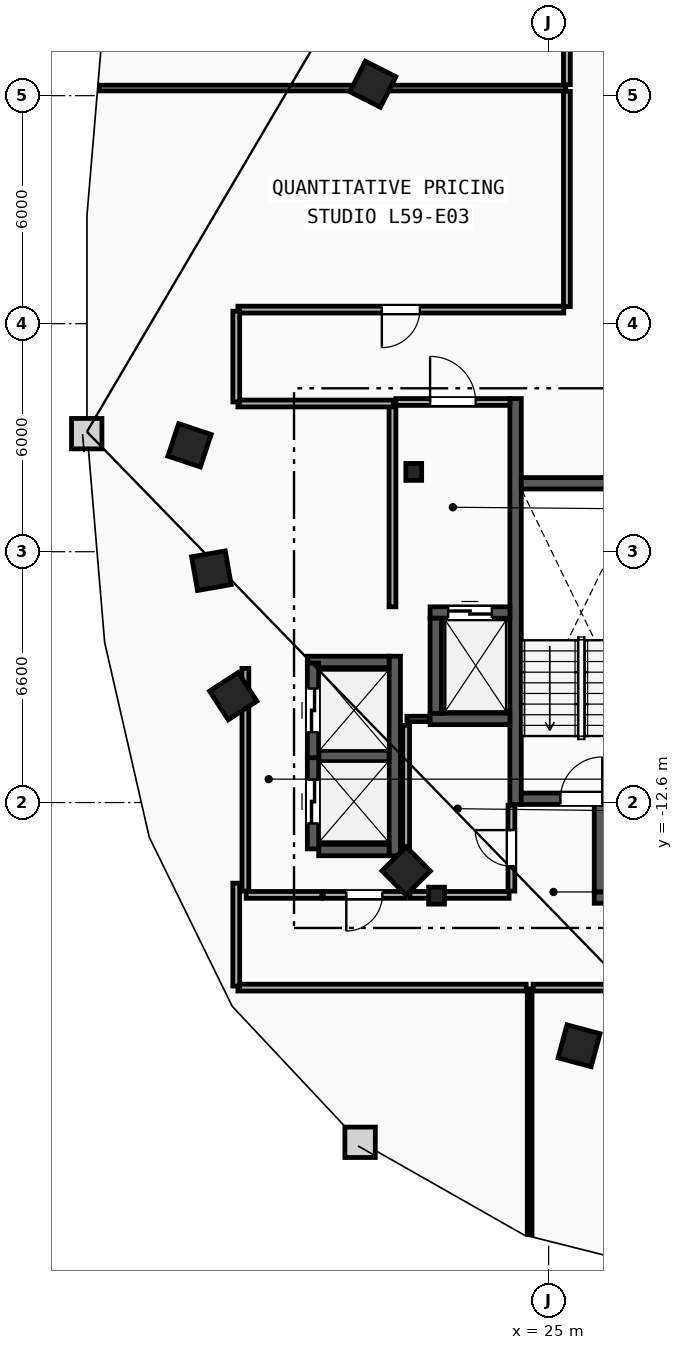
"""IFC4 building model, lengths in metres.
Left out: names, types, materials, properties, quantities, classifications, styles, units other than length and angle.
Written with IfcOpenShell. Run it as: python <this file> out.ifc"""

import sys

from ifc_helpers import new_model, si_unit, direction, frame, frame_2d, origin, origin_2d, place, context, subcontext, project, spatial, rectangle, i_section, extrude, element, fill, save


model = new_model("IFC4")
c1 = context("Model", 3, precision=1e-05, world=origin(), true_north=direction((0.0, 1.0)))
c2 = subcontext(c1, "Body", "Model", "MODEL_VIEW")
j1 = project(units=[si_unit("LENGTHUNIT", "METRE"), si_unit("PLANEANGLEUNIT", "RADIAN")], contexts=[c1])
p1 = place(None, origin())
s1 = spatial("IfcSite", under=j1, at=p1, CompositionType="ELEMENT")
p2 = place(p1, origin())
s2 = spatial("IfcBuilding", under=s1, at=p2, CompositionType="ELEMENT")
p3 = place(p2, frame((0.0, 0.0, 224.2)))
s3 = spatial("IfcBuildingStorey", under=s2, at=p3, CompositionType="ELEMENT", Elevation=224.2)
for number, where, z_axis, x_axis in (
    (1, (21.45, -3.9, 0.0), (0.0, 0.0, 1.0), (1.0, 0.0, 0.0)),
    (2, (22.05, -15.05, 0.0), (0.0, 0.0, 1.0), (1.0, 0.0, 0.0)),
):
    element("IfcColumn", number, at=place(p3, frame(where, z_axis=z_axis, x_axis=x_axis)), inside=s3, PredefinedType="COLUMN", context=c2, shape_type="SweptSolid", body=[
        extrude(i_section(OverallWidth=0.416, OverallDepth=0.446, WebThickness=0.039, FlangeThickness=0.063, FilletRadius=0.018, at=origin_2d()), origin(), (0.0, 0.0, 1.0), 3.6),
    ])
for number, where, z_axis, x_axis in (
    (3, (15.55, -3.2, 0.0), (0.0, 0.0, 1.0), (-0.315, -0.949, 0.0)),
    (4, (16.125, -6.5, 0.0), (0.0, 0.0, 1.0), (0.172, -0.985, 0.0)),
    (5, (16.7, -9.8, 0.0), (0.0, 0.0, 1.0), (0.544, -0.839, 0.0)),
    (6, (21.25, -14.4, 0.0), (0.0, 0.0, 1.0), (0.703, -0.711, 0.0)),
    (7, (25.8, -19.0, 0.0), (0.0, 0.0, 1.0), (0.966, -0.259, 0.0)),
    (8, (20.375, 6.3, 0.0), (0.0, 0.0, 1.0), (-0.453, -0.892, 0.0)),
):
    element("IfcColumn", number, at=place(p3, frame(where, z_axis=z_axis, x_axis=x_axis)), inside=s3, PredefinedType="COLUMN", context=c2, shape_type="SweptSolid", body=[
        extrude(rectangle(XDim=0.9, YDim=0.9, at=origin_2d()), origin(), (0.0, 0.0, 1.0), 3.6),
    ])
p4 = place(p3, frame((24.13, -12.65, 0.0), z_axis=(0.0, 0.0, 1.0), x_axis=(0.0, 1.0, 0.0)))
e9 = element("IfcWall", 9, at=p4, inside=s3, PredefinedType="SHEAR", context=c2, shape_type="SweptSolid", body=[
    extrude(rectangle(XDim=10.68, YDim=0.3, at=frame_2d((5.34, 0.0))), origin(), (0.0, 0.0, 1.0), 3.34),
])
p5 = place(p3, frame((24.28, -12.5, 0.0), z_axis=(0.0, 0.0, 1.0), x_axis=(1.0, 0.0, 0.0)))
e10 = element("IfcWall", 10, at=p5, inside=s3, PredefinedType="SHEAR", context=c2, shape_type="SweptSolid", body=[
    extrude(rectangle(XDim=3.16, YDim=0.3, at=frame_2d((1.58, 0.0))), origin(), (0.0, 0.0, 1.0), 3.34),
])
p6 = place(p5, frame((1.03, 0.0, 0.0)))
e11 = element("IfcOpeningElement", 11, at=p6, cuts=e10, PredefinedType="OPENING", context=c2, shape_type="SweptSolid", body=[
    extrude(rectangle(XDim=1.1, YDim=2.15, at=frame_2d((0.55, 1.075))), frame((0.0, 0.16, 0.0), z_axis=(0.0, -1.0, 0.0), x_axis=(1.0, 0.0, 0.0)), (0.0, 0.0, 1.0), 0.32),
])
p7 = place(p3, frame((24.28, -4.2, 0.0), z_axis=(0.0, 0.0, 1.0), x_axis=(1.0, 0.0, 0.0)))
e12 = element("IfcWall", 12, at=p7, inside=s3, PredefinedType="SHEAR", context=c2, shape_type="SweptSolid", body=[
    extrude(rectangle(XDim=3.16, YDim=0.3, at=frame_2d((1.58, 0.0))), origin(), (0.0, 0.0, 1.0), 3.34),
])
p8 = place(p3, frame((20.89, -7.45, 0.0), z_axis=(0.0, 0.0, 1.0), x_axis=(0.0, 1.0, 0.0)))
e13 = element("IfcWall", 13, at=p8, inside=s3, PredefinedType="PARTITIONING", context=c2, shape_type="SweptSolid", body=[
    extrude(rectangle(XDim=5.3, YDim=0.18, at=frame_2d((2.65, 0.0))), origin(), (0.0, 0.0, 1.0), 3.34),
])
p9 = place(p3, frame((20.98, -2.06, 0.0), z_axis=(0.0, 0.0, 1.0), x_axis=(1.0, 0.0, 0.0)))
e14 = element("IfcWall", 14, at=p9, inside=s3, PredefinedType="PARTITIONING", context=c2, shape_type="SweptSolid", body=[
    extrude(rectangle(XDim=3.0, YDim=0.18, at=frame_2d((1.5, 0.0))), origin(), (0.0, 0.0, 1.0), 3.34),
])
p10 = place(p9, frame((0.9, 0.0, 0.0)))
e15 = element("IfcOpeningElement", 15, at=p10, cuts=e14, PredefinedType="OPENING", context=c2, shape_type="SweptSolid", body=[
    extrude(rectangle(XDim=1.2, YDim=2.15, at=frame_2d((0.6, 1.075))), frame((0.0, 0.1, 0.0), z_axis=(0.0, -1.0, 0.0), x_axis=(1.0, 0.0, 0.0)), (0.0, 0.0, 1.0), 0.2),
])
p11 = place(p3, frame((21.88, -7.6, 0.0), z_axis=(0.0, 0.0, 1.0), x_axis=(1.0, 0.0, 0.0)))
e16 = element("IfcWall", 16, at=p11, inside=s3, PredefinedType="SHEAR", context=c2, shape_type="SweptSolid", body=[
    extrude(rectangle(XDim=2.1, YDim=0.3, at=frame_2d((1.05, 0.0))), origin(), (0.0, 0.0, 1.0), 3.34),
])
p12 = place(p11, frame((0.475, 0.0, 0.0)))
e17 = element("IfcOpeningElement", 17, at=p12, cuts=e16, PredefinedType="OPENING", context=c2, shape_type="SweptSolid", body=[
    extrude(rectangle(XDim=1.15, YDim=2.2, at=frame_2d((0.575, 1.1))), frame((0.0, 0.16, 0.0), z_axis=(0.0, -1.0, 0.0), x_axis=(1.0, 0.0, 0.0)), (0.0, 0.0, 1.0), 0.32),
])
p13 = place(p3, frame((21.88, -10.4, 0.0), z_axis=(0.0, 0.0, 1.0), x_axis=(1.0, 0.0, 0.0)))
e18 = element("IfcWall", 18, at=p13, inside=s3, PredefinedType="SHEAR", context=c2, shape_type="SweptSolid", body=[
    extrude(rectangle(XDim=2.1, YDim=0.3, at=frame_2d((1.05, 0.0))), origin(), (0.0, 0.0, 1.0), 3.34),
])
for number, where, z_axis, x_axis in (
    (19, (22.03, -10.25, 0.0), (0.0, 0.0, 1.0), (0.0, 1.0, 0.0)),
    (20, (26.2, -15.1, 0.0), (0.0, 0.0, 1.0), (1.0, 0.0, 0.0)),
):
    element("IfcWall", number, at=place(p3, frame(where, z_axis=z_axis, x_axis=x_axis)), inside=s3, PredefinedType="SHEAR", context=c2, shape_type="SweptSolid", body=[
        extrude(rectangle(XDim=2.5, YDim=0.3, at=frame_2d((1.25, 0.0))), origin(), (0.0, 0.0, 1.0), 3.34),
    ])
p14 = place(p3, frame((26.35, -14.95, 0.0), z_axis=(0.0, 0.0, 1.0), x_axis=(0.0, 1.0, 0.0)))
e21 = element("IfcWall", 21, at=p14, inside=s3, PredefinedType="SHEAR", context=c2, shape_type="SweptSolid", body=[
    extrude(rectangle(XDim=2.3, YDim=0.3, at=frame_2d((1.15, 0.0))), origin(), (0.0, 0.0, 1.0), 3.34),
])
p15 = place(p3, frame((20.95, -14.0, 0.0), z_axis=(0.0, 0.0, 1.0), x_axis=(0.0, 1.0, 0.0)))
e22 = element("IfcWall", 22, at=p15, inside=s3, PredefinedType="SHEAR", context=c2, shape_type="SweptSolid", body=[
    extrude(rectangle(XDim=5.25, YDim=0.3, at=frame_2d((2.625, 0.0))), origin(), (0.0, 0.0, 1.0), 3.34),
])
p16 = place(p3, frame((18.95, -13.85, 0.0), z_axis=(0.0, 0.0, 1.0), x_axis=(1.0, 0.0, 0.0)))
e23 = element("IfcWall", 23, at=p16, inside=s3, PredefinedType="SHEAR", context=c2, shape_type="SweptSolid", body=[
    extrude(rectangle(XDim=1.85, YDim=0.3, at=frame_2d((0.925, 0.0))), origin(), (0.0, 0.0, 1.0), 3.34),
])
p17 = place(p3, frame((18.65, -8.9, 0.0), z_axis=(0.0, 0.0, 1.0), x_axis=(1.0, 0.0, 0.0)))
e24 = element("IfcWall", 24, at=p17, inside=s3, PredefinedType="SHEAR", context=c2, shape_type="SweptSolid", body=[
    extrude(rectangle(XDim=2.15, YDim=0.3, at=frame_2d((1.075, 0.0))), origin(), (0.0, 0.0, 1.0), 3.34),
])
p18 = place(p3, frame((18.95, -11.375, 0.0), z_axis=(0.0, 0.0, 1.0), x_axis=(1.0, 0.0, 0.0)))
e25 = element("IfcWall", 25, at=p18, inside=s3, PredefinedType="SHEAR", context=c2, shape_type="SweptSolid", body=[
    extrude(rectangle(XDim=1.85, YDim=0.3, at=frame_2d((0.925, 0.0))), origin(), (0.0, 0.0, 1.0), 3.34),
])
p19 = place(p3, frame((18.8, -13.82, 0.0), z_axis=(0.0, 0.0, 1.0), x_axis=(0.0, 1.0, 0.0)))
e26 = element("IfcWall", 26, at=p19, inside=s3, PredefinedType="SHEAR", context=c2, shape_type="SweptSolid", body=[
    extrude(rectangle(XDim=2.49, YDim=0.3, at=frame_2d((1.245, 0.0))), origin(), (0.0, 0.0, 1.0), 3.34),
])
p20 = place(p19, frame((0.67, 0.0, 0.0)))
e27 = element("IfcOpeningElement", 27, at=p20, cuts=e26, PredefinedType="OPENING", context=c2, shape_type="SweptSolid", body=[
    extrude(rectangle(XDim=1.15, YDim=2.2, at=frame_2d((0.575, 1.1))), frame((0.0, 0.16, 0.0), z_axis=(0.0, -1.0, 0.0), x_axis=(1.0, 0.0, 0.0)), (0.0, 0.0, 1.0), 0.32),
])
p21 = place(p3, frame((18.8, -11.42, 0.0), z_axis=(0.0, 0.0, 1.0), x_axis=(0.0, 1.0, 0.0)))
e28 = element("IfcWall", 28, at=p21, inside=s3, PredefinedType="SHEAR", context=c2, shape_type="SweptSolid", body=[
    extrude(rectangle(XDim=2.49, YDim=0.3, at=frame_2d((1.245, 0.0))), origin(), (0.0, 0.0, 1.0), 3.34),
])
p22 = place(p21, frame((0.67, 0.0, 0.0)))
e29 = element("IfcOpeningElement", 29, at=p22, cuts=e28, PredefinedType="OPENING", context=c2, shape_type="SweptSolid", body=[
    extrude(rectangle(XDim=1.15, YDim=2.2, at=frame_2d((0.575, 1.1))), frame((0.0, 0.16, 0.0), z_axis=(0.0, -1.0, 0.0), x_axis=(1.0, 0.0, 0.0)), (0.0, 0.0, 1.0), 0.32),
])
p23 = place(p3, frame((17.02, -14.93, 0.0), z_axis=(0.0, 0.0, 1.0), x_axis=(0.0, 1.0, 0.0)))
e30 = element("IfcWall", 30, at=p23, inside=s3, PredefinedType="PARTITIONING", context=c2, shape_type="SweptSolid", body=[
    extrude(rectangle(XDim=5.86, YDim=0.18, at=frame_2d((2.93, 0.0))), origin(), (0.0, 0.0, 1.0), 3.34),
])
p24 = place(p3, frame((17.04, -15.03, 0.0), z_axis=(0.0, 0.0, 1.0), x_axis=(1.0, 0.0, 0.0)))
e31 = element("IfcWall", 31, at=p24, inside=s3, PredefinedType="PARTITIONING", context=c2, shape_type="SweptSolid", body=[
    extrude(rectangle(XDim=1.99, YDim=0.18, at=frame_2d((0.995, 0.0))), origin(), (0.0, 0.0, 1.0), 3.34),
])
p25 = place(p3, frame((21.23, -15.03, 0.0), z_axis=(0.0, 0.0, 1.0), x_axis=(-1.0, 0.0, 0.0)))
e32 = element("IfcWall", 32, at=p25, inside=s3, PredefinedType="PARTITIONING", context=c2, shape_type="SweptSolid", body=[
    extrude(rectangle(XDim=2.16, YDim=0.18, at=frame_2d((1.08, 0.0))), origin(), (0.0, 0.0, 1.0), 3.34),
])
p26 = place(p25, frame((0.605, 0.0, 0.0)))
e33 = element("IfcOpeningElement", 33, at=p26, cuts=e32, PredefinedType="OPENING", context=c2, shape_type="SweptSolid", body=[
    extrude(rectangle(XDim=0.95, YDim=2.1, at=frame_2d((0.475, 1.05))), frame((0.0, 0.1, 0.0), z_axis=(0.0, -1.0, 0.0), x_axis=(1.0, 0.0, 0.0)), (0.0, 0.0, 1.0), 0.2),
])
p27 = place(p3, frame((21.27, -10.4, 0.0), z_axis=(0.0, 0.0, 1.0), x_axis=(1.0, 0.0, 0.0)))
e34 = element("IfcWall", 34, at=p27, inside=s3, PredefinedType="PARTITIONING", context=c2, shape_type="SweptSolid", body=[
    extrude(rectangle(XDim=0.59, YDim=0.14, at=frame_2d((0.295, 0.0))), origin(), (0.0, 0.0, 1.0), 3.34),
])
p28 = place(p3, frame((21.25, -14.93, 0.0), z_axis=(0.0, 0.0, 1.0), x_axis=(0.0, 1.0, 0.0)))
e35 = element("IfcWall", 35, at=p28, inside=s3, PredefinedType="PARTITIONING", context=c2, shape_type="SweptSolid", body=[
    extrude(rectangle(XDim=4.36, YDim=0.18, at=frame_2d((2.18, 0.0))), origin(), (0.0, 0.0, 1.0), 3.34),
])
p29 = place(p3, frame((21.35, -15.03, 0.0), z_axis=(0.0, 0.0, 1.0), x_axis=(1.0, 0.0, 0.0)))
e36 = element("IfcWall", 36, at=p29, inside=s3, PredefinedType="PARTITIONING", context=c2, shape_type="SweptSolid", body=[
    extrude(rectangle(XDim=2.61, YDim=0.18, at=frame_2d((1.305, 0.0))), origin(), (0.0, 0.0, 1.0), 2.413),
])
p30 = place(p3, frame((24.02, -14.93, 0.0), z_axis=(0.0, 0.0, 1.0), x_axis=(0.0, 1.0, 0.0)))
e37 = element("IfcWall", 37, at=p30, inside=s3, PredefinedType="PARTITIONING", context=c2, shape_type="SweptSolid", body=[
    extrude(rectangle(XDim=2.26, YDim=0.18, at=frame_2d((1.13, 0.0))), origin(), (0.0, 0.0, 1.0), 3.34),
])
p31 = place(p30, frame((0.655, 0.0, 0.0)))
e38 = element("IfcOpeningElement", 38, at=p31, cuts=e37, PredefinedType="OPENING", context=c2, shape_type="SweptSolid", body=[
    extrude(rectangle(XDim=0.95, YDim=2.1, at=frame_2d((0.475, 1.05))), frame((0.0, 0.1, 0.0), z_axis=(0.0, -1.0, 0.0), x_axis=(1.0, 0.0, 0.0)), (0.0, 0.0, 1.0), 0.2),
])
p32 = place(p3, frame((13.183, 6.2, 0.0), z_axis=(0.0, 0.0, 1.0), x_axis=(1.0, 0.0, 0.0)))
e39 = element("IfcWall", 39, at=p32, inside=s3, PredefinedType="PARTITIONING", context=c2, shape_type="SweptSolid", body=[
    extrude(rectangle(XDim=12.267, YDim=0.15, at=frame_2d((6.133, 0.0))), origin(), (0.0, 0.0, 1.0), 3.34),
])
p33 = place(p3, frame((24.5, -23.963, 0.0), z_axis=(0.0, 0.0, 1.0), x_axis=(0.0, 1.0, 0.0)))
e40 = element("IfcWall", 40, at=p33, inside=s3, PredefinedType="PARTITIONING", context=c2, shape_type="SweptSolid", body=[
    extrude(rectangle(XDim=6.463, YDim=0.125, at=frame_2d((3.231, 0.0))), origin(), (0.0, 0.0, 1.0), 3.34),
])
p34 = place(p3, frame((24.59, -17.47, 0.0), z_axis=(0.0, 0.0, 1.0), x_axis=(1.0, 0.0, 0.0)))
e41 = element("IfcWall", 41, at=p34, inside=s3, PredefinedType="PARTITIONING", context=c2, shape_type="SweptSolid", body=[
    extrude(rectangle(XDim=7.82, YDim=0.18, at=frame_2d((3.91, 0.0))), origin(), (0.0, 0.0, 1.0), 3.34),
])
p35 = place(p34, frame((3.41, 0.0, 0.0)))
e42 = element("IfcOpeningElement", 42, at=p35, cuts=e41, PredefinedType="OPENING", context=c2, shape_type="SweptSolid", body=[
    extrude(rectangle(XDim=1.0, YDim=2.15, at=frame_2d((0.5, 1.075))), frame((0.0, 0.1, 0.0), z_axis=(0.0, -1.0, 0.0), x_axis=(1.0, 0.0, 0.0)), (0.0, 0.0, 1.0), 0.2),
])
p36 = place(p3, frame((25.4, 0.37, 0.0), z_axis=(0.0, 0.0, 1.0), x_axis=(-1.0, 0.0, 0.0)))
e43 = element("IfcWall", 43, at=p36, inside=s3, PredefinedType="PARTITIONING", context=c2, shape_type="SweptSolid", body=[
    extrude(rectangle(XDim=8.578, YDim=0.18, at=frame_2d((4.289, 0.0))), origin(), (0.0, 0.0, 1.0), 3.34),
])
p37 = place(p36, frame((3.789, 0.0, 0.0)))
e44 = element("IfcOpeningElement", 44, at=p37, cuts=e43, PredefinedType="OPENING", context=c2, shape_type="SweptSolid", body=[
    extrude(rectangle(XDim=1.0, YDim=2.15, at=frame_2d((0.5, 1.075))), frame((0.0, 0.1, 0.0), z_axis=(0.0, -1.0, 0.0), x_axis=(1.0, 0.0, 0.0)), (0.0, 0.0, 1.0), 0.2),
])
p38 = place(p3, frame((16.822, -17.47, 0.0), z_axis=(0.0, 0.0, 1.0), x_axis=(1.0, 0.0, 0.0)))
e45 = element("IfcWall", 45, at=p38, inside=s3, PredefinedType="PARTITIONING", context=c2, shape_type="SweptSolid", body=[
    extrude(rectangle(XDim=7.588, YDim=0.18, at=frame_2d((3.794, 0.0))), origin(), (0.0, 0.0, 1.0), 3.34),
])
p39 = place(p3, frame((25.48, 6.11, 0.0), z_axis=(0.0, 0.0, 1.0), x_axis=(0.0, -1.0, 0.0)))
e46 = element("IfcWall", 46, at=p39, inside=s3, PredefinedType="PARTITIONING", context=c2, shape_type="SweptSolid", body=[
    extrude(rectangle(XDim=5.66, YDim=0.18, at=frame_2d((2.83, 0.0))), origin(), (0.0, 0.0, 1.0), 3.34),
])
p40 = place(p3, frame((16.822, -2.1, 0.0), z_axis=(0.0, 0.0, 1.0), x_axis=(1.0, 0.0, 0.0)))
e47 = element("IfcWall", 47, at=p40, inside=s3, PredefinedType="PARTITIONING", context=c2, shape_type="SweptSolid", body=[
    extrude(rectangle(XDim=4.098, YDim=0.18, at=frame_2d((2.049, 0.0))), origin(), (0.0, 0.0, 1.0), 3.34),
])
p41 = place(p3, frame((16.78, -14.721, 0.0), z_axis=(0.0, 0.0, 1.0), x_axis=(0.0, -1.0, 0.0)))
e48 = element("IfcWall", 48, at=p41, inside=s3, PredefinedType="PARTITIONING", context=c2, shape_type="SweptSolid", body=[
    extrude(rectangle(XDim=2.707, YDim=0.18, at=frame_2d((1.354, 0.0))), origin(), (0.0, 0.0, 1.0), 3.34),
])
p42 = place(p3, frame((16.78, 0.329, 0.0), z_axis=(0.0, 0.0, 1.0), x_axis=(0.0, -1.0, 0.0)))
e49 = element("IfcWall", 49, at=p42, inside=s3, PredefinedType="PARTITIONING", context=c2, shape_type="SweptSolid", body=[
    extrude(rectangle(XDim=2.387, YDim=0.18, at=frame_2d((1.194, 0.0))), origin(), (0.0, 0.0, 1.0), 3.34),
])
p43 = place(p3, frame((25.48, 11.178, 0.0), z_axis=(0.0, 0.0, 1.0), x_axis=(0.0, -1.0, 0.0)))
e50 = element("IfcWall", 50, at=p43, inside=s3, PredefinedType="PARTITIONING", context=c2, shape_type="SweptSolid", body=[
    extrude(rectangle(XDim=4.888, YDim=0.18, at=frame_2d((2.444, 0.0))), origin(), (0.0, 0.0, 1.0), 3.34),
])
p44 = place(p6, origin())
e51 = element("IfcDoor", 51, at=p44, inside=s3, OperationType="SINGLE_SWING_RIGHT", PredefinedType="DOOR", context=c2, shape_type="SweptSolid", body=[
    extrude(rectangle(XDim=1.1, YDim=2.15, at=frame_2d((0.55, 1.075))), frame((0.0, 0.025, 0.0), z_axis=(0.0, -1.0, 0.0), x_axis=(1.0, 0.0, 0.0)), (0.0, 0.0, 1.0), 0.05),
])
fill(e11, e51)
p45 = place(p10, origin())
e52 = element("IfcDoor", 52, at=p45, inside=s3, OperationType="SINGLE_SWING_LEFT", PredefinedType="DOOR", context=c2, shape_type="SweptSolid", body=[
    extrude(rectangle(XDim=1.2, YDim=2.15, at=frame_2d((0.6, 1.075))), frame((0.0, 0.025, 0.0), z_axis=(0.0, -1.0, 0.0), x_axis=(1.0, 0.0, 0.0)), (0.0, 0.0, 1.0), 0.05),
])
fill(e15, e52)
p46 = place(p12, origin())
e53 = element("IfcDoor", 53, at=p46, inside=s3, OperationType="SLIDING_TO_LEFT", PredefinedType="TRAPDOOR", context=c2, shape_type="SweptSolid", body=[
    extrude(rectangle(XDim=1.15, YDim=2.2, at=frame_2d((0.575, 1.1))), frame((0.0, 0.025, 0.0), z_axis=(0.0, -1.0, 0.0), x_axis=(1.0, 0.0, 0.0)), (0.0, 0.0, 1.0), 0.05),
])
fill(e17, e53)
p47 = place(p20, origin())
e54 = element("IfcDoor", 54, at=p47, inside=s3, OperationType="SLIDING_TO_LEFT", PredefinedType="TRAPDOOR", context=c2, shape_type="SweptSolid", body=[
    extrude(rectangle(XDim=1.15, YDim=2.2, at=frame_2d((0.575, 1.1))), frame((0.0, 0.025, 0.0), z_axis=(0.0, -1.0, 0.0), x_axis=(1.0, 0.0, 0.0)), (0.0, 0.0, 1.0), 0.05),
])
fill(e27, e54)
p48 = place(p22, origin())
e55 = element("IfcDoor", 55, at=p48, inside=s3, OperationType="SLIDING_TO_LEFT", PredefinedType="TRAPDOOR", context=c2, shape_type="SweptSolid", body=[
    extrude(rectangle(XDim=1.15, YDim=2.2, at=frame_2d((0.575, 1.1))), frame((0.0, 0.025, 0.0), z_axis=(0.0, -1.0, 0.0), x_axis=(1.0, 0.0, 0.0)), (0.0, 0.0, 1.0), 0.05),
])
fill(e29, e55)
p49 = place(p37, origin())
e56 = element("IfcDoor", 56, at=p49, inside=s3, OperationType="SINGLE_SWING_RIGHT", PredefinedType="DOOR", context=c2, shape_type="SweptSolid", body=[
    extrude(rectangle(XDim=1.0, YDim=2.15, at=frame_2d((0.5, 1.075))), frame((0.0, 0.025, 0.0), z_axis=(0.0, -1.0, 0.0), x_axis=(1.0, 0.0, 0.0)), (0.0, 0.0, 1.0), 0.05),
])
fill(e44, e56)
p50 = place(p31, origin())
e57 = element("IfcDoor", 57, at=p50, inside=s3, OperationType="SINGLE_SWING_RIGHT", PredefinedType="DOOR", context=c2, shape_type="SweptSolid", body=[
    extrude(rectangle(XDim=0.95, YDim=2.1, at=frame_2d((0.475, 1.05))), frame((0.0, 0.025, 0.0), z_axis=(0.0, -1.0, 0.0), x_axis=(1.0, 0.0, 0.0)), (0.0, 0.0, 1.0), 0.05),
])
fill(e38, e57)
p51 = place(p26, origin())
e58 = element("IfcDoor", 58, at=p51, inside=s3, OperationType="SINGLE_SWING_RIGHT", PredefinedType="DOOR", context=c2, shape_type="SweptSolid", body=[
    extrude(rectangle(XDim=0.95, YDim=2.1, at=frame_2d((0.475, 1.05))), frame((0.0, 0.025, 0.0), z_axis=(0.0, -1.0, 0.0), x_axis=(1.0, 0.0, 0.0)), (0.0, 0.0, 1.0), 0.05),
])
fill(e33, e58)
save(model, sys.argv[1])
